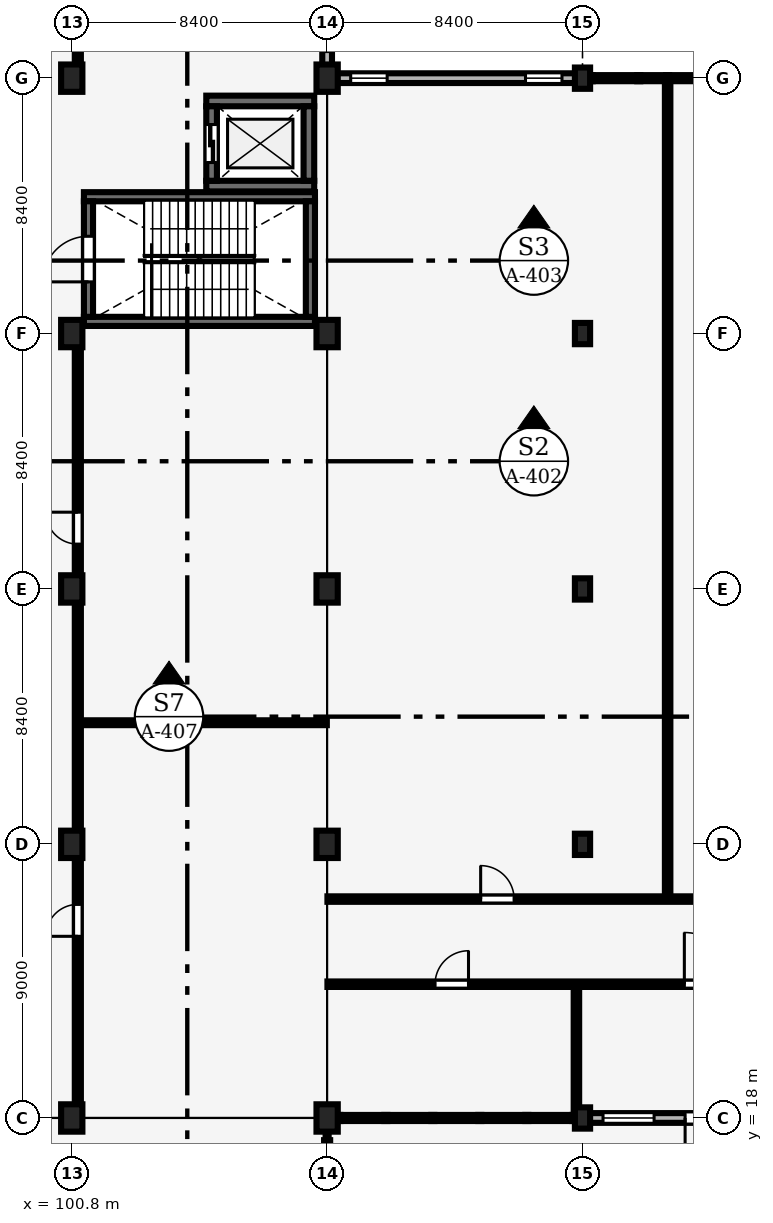
"""IFC4 building model, lengths in metres.
Left out: names, types, materials, properties, quantities, classifications, styles, units other than length and angle.
Written with IfcOpenShell. Run it as: python <this file> out.ifc"""

import sys

from ifc_helpers import new_model, si_unit, direction, frame, frame_2d, origin, origin_2d, place, context, subcontext, project, spatial, rectangle, extrude, element, fill, save


model = new_model("IFC4")
c1 = context("Model", 3, precision=1e-05, world=origin(), true_north=direction((0.0, 1.0)))
c2 = subcontext(c1, "Body", "Model", "MODEL_VIEW")
j1 = project(units=[si_unit("LENGTHUNIT", "METRE"), si_unit("PLANEANGLEUNIT", "RADIAN")], contexts=[c1])
p1 = place(None, origin())
s1 = spatial("IfcSite", under=j1, at=p1, CompositionType="ELEMENT")
p2 = place(p1, origin())
s2 = spatial("IfcBuilding", under=s1, at=p2, CompositionType="ELEMENT")
p3 = place(p2, origin())
s3 = spatial("IfcBuildingStorey", under=s2, at=p3, CompositionType="ELEMENT", Elevation=0.0)
for number, where, z_axis, x_axis in (
    (1, (100.8, 18.0, 0.0), (0.0, 0.0, 1.0), (1.0, 0.0, 0.0)),
    (2, (100.8, 27.0, 0.0), (0.0, 0.0, 1.0), (1.0, 0.0, 0.0)),
    (3, (100.8, 35.4, 0.0), (0.0, 0.0, 1.0), (1.0, 0.0, 0.0)),
    (4, (100.8, 43.8, 0.0), (0.0, 0.0, 1.0), (1.0, 0.0, 0.0)),
    (5, (100.8, 52.2, 0.0), (0.0, 0.0, 1.0), (1.0, 0.0, 0.0)),
    (6, (109.2, 18.0, 0.0), (0.0, 0.0, 1.0), (1.0, 0.0, 0.0)),
    (7, (109.2, 27.0, 0.0), (0.0, 0.0, 1.0), (1.0, 0.0, 0.0)),
    (8, (109.2, 35.4, 0.0), (0.0, 0.0, 1.0), (1.0, 0.0, 0.0)),
    (9, (109.2, 43.8, 0.0), (0.0, 0.0, 1.0), (1.0, 0.0, 0.0)),
    (10, (109.2, 52.2, 0.0), (0.0, 0.0, 1.0), (1.0, 0.0, 0.0)),
):
    element("IfcColumn", number, at=place(p3, frame(where, z_axis=z_axis, x_axis=x_axis)), inside=s3, PredefinedType="COLUMN", context=c2, shape_type="SweptSolid", body=[
        extrude(rectangle(XDim=0.7, YDim=0.9, at=origin_2d()), origin(), (0.0, 0.0, 1.0), 4.8),
    ])
for number, where, z_axis, x_axis in (
    (11, (117.6, 18.0, 0.0), (0.0, 0.0, 1.0), (1.0, 0.0, 0.0)),
    (12, (117.6, 27.0, 0.0), (0.0, 0.0, 1.0), (1.0, 0.0, 0.0)),
    (13, (117.6, 35.4, 0.0), (0.0, 0.0, 1.0), (1.0, 0.0, 0.0)),
    (14, (117.6, 43.8, 0.0), (0.0, 0.0, 1.0), (1.0, 0.0, 0.0)),
    (15, (117.6, 52.2, 0.0), (0.0, 0.0, 1.0), (1.0, 0.0, 0.0)),
):
    element("IfcColumn", number, at=place(p3, frame(where, z_axis=z_axis, x_axis=x_axis)), inside=s3, PredefinedType="COLUMN", context=c2, shape_type="SweptSolid", body=[
        extrude(rectangle(XDim=0.5, YDim=0.7, at=origin_2d()), origin(), (0.0, 0.0, 1.0), 4.8),
    ])
p4 = place(p3, frame((117.825, 18.0, 0.0), z_axis=(0.0, 0.0, 1.0), x_axis=(1.0, 0.0, 0.0)))
e16 = element("IfcWall", 16, at=p4, inside=s3, PredefinedType="SOLIDWALL", context=c2, shape_type="SweptSolid", body=[
    extrude(rectangle(XDim=7.95, YDim=0.32, at=frame_2d((3.975, 0.0))), origin(), (0.0, 0.0, 1.0), 3.37),
])
p5 = place(p4, frame((4.8, 0.0, 0.0), z_axis=(0.0, 0.0, 1.0), x_axis=(-1.0, 0.0, 0.0)))
e17 = element("IfcOpeningElement", 17, at=p5, cuts=e16, PredefinedType="OPENING", context=c2, shape_type="SweptSolid", body=[
    extrude(rectangle(XDim=1.65, YDim=2.25, at=frame_2d((0.825, 1.125))), frame((0.0, 0.17, 0.0), z_axis=(0.0, -1.0, 0.0), x_axis=(1.0, 0.0, 0.0)), (0.0, 0.0, 1.0), 0.34),
])
p6 = place(p4, frame((0.45, 0.0, 0.95)))
e18 = element("IfcOpeningElement", 18, at=p6, cuts=e16, PredefinedType="OPENING", context=c2, shape_type="SweptSolid", body=[
    extrude(rectangle(XDim=1.68, YDim=1.8, at=frame_2d((0.84, 0.9))), frame((0.0, 0.17, 0.0), z_axis=(0.0, -1.0, 0.0), x_axis=(1.0, 0.0, 0.0)), (0.0, 0.0, 1.0), 0.34),
])
p7 = place(p3, frame((109.525, 52.2, 0.0), z_axis=(0.0, 0.0, 1.0), x_axis=(1.0, 0.0, 0.0)))
e19 = element("IfcWall", 19, at=p7, inside=s3, PredefinedType="SOLIDWALL", context=c2, shape_type="SweptSolid", body=[
    extrude(rectangle(XDim=7.85, YDim=0.32, at=frame_2d((3.925, 0.0))), origin(), (0.0, 0.0, 1.0), 4.03),
])
p8 = place(p7, frame((0.45, 0.0, 0.9)))
e20 = element("IfcOpeningElement", 20, at=p8, cuts=e19, PredefinedType="OPENING", context=c2, shape_type="SweptSolid", body=[
    extrude(rectangle(XDim=1.2, YDim=1.5, at=frame_2d((0.6, 0.75))), frame((0.0, 0.17, 0.0), z_axis=(0.0, -1.0, 0.0), x_axis=(1.0, 0.0, 0.0)), (0.0, 0.0, 1.0), 0.34),
])
p9 = place(p7, frame((6.2, 0.0, 0.9)))
e21 = element("IfcOpeningElement", 21, at=p9, cuts=e19, PredefinedType="OPENING", context=c2, shape_type="SweptSolid", body=[
    extrude(rectangle(XDim=1.2, YDim=1.8, at=frame_2d((0.6, 0.9))), frame((0.0, 0.17, 0.0), z_axis=(0.0, -1.0, 0.0), x_axis=(1.0, 0.0, 0.0)), (0.0, 0.0, 1.0), 0.34),
])
p10 = place(p3, frame((109.2, 52.625, 0.0), z_axis=(0.0, 0.0, 1.0), x_axis=(0.0, 1.0, 0.0)))
e22 = element("IfcWall", 22, at=p10, inside=s3, PredefinedType="SOLIDWALL", context=c2, shape_type="SweptSolid", body=[
    extrude(rectangle(XDim=7.55, YDim=0.32, at=frame_2d((3.775, 0.0))), origin(), (0.0, 0.0, 1.0), 3.89),
])
p11 = place(p10, frame((4.6, 0.0, 0.0), z_axis=(0.0, 0.0, 1.0), x_axis=(-1.0, 0.0, 0.0)))
e23 = element("IfcOpeningElement", 23, at=p11, cuts=e22, PredefinedType="OPENING", context=c2, shape_type="SweptSolid", body=[
    extrude(rectangle(XDim=1.65, YDim=2.25, at=frame_2d((0.825, 1.125))), frame((0.0, 0.17, 0.0), z_axis=(0.0, -1.0, 0.0), x_axis=(1.0, 0.0, 0.0)), (0.0, 0.0, 1.0), 0.34),
])
p12 = place(p10, frame((0.45, 0.0, 0.95)))
e24 = element("IfcOpeningElement", 24, at=p12, cuts=e22, PredefinedType="OPENING", context=c2, shape_type="SweptSolid", body=[
    extrude(rectangle(XDim=1.68, YDim=2.1, at=frame_2d((0.84, 1.05))), frame((0.0, 0.17, 0.0), z_axis=(0.0, -1.0, 0.0), x_axis=(1.0, 0.0, 0.0)), (0.0, 0.0, 1.0), 0.34),
])
for number, where, z_axis, x_axis in (
    (25, (101.2, 44.2, 0.0), (0.0, 0.0, 1.0), (1.0, 0.0, 0.0)),
    (26, (101.2, 48.3, 0.0), (0.0, 0.0, 1.0), (1.0, 0.0, 0.0)),
):
    element("IfcWall", number, at=place(p3, frame(where, z_axis=z_axis, x_axis=x_axis)), inside=s3, PredefinedType="SHEAR", context=c2, shape_type="SweptSolid", body=[
        extrude(rectangle(XDim=7.6, YDim=0.3, at=frame_2d((3.8, 0.0))), origin(), (0.0, 0.0, 1.0), 4.625),
    ])
p13 = place(p3, frame((101.35, 44.35, 0.0), z_axis=(0.0, 0.0, 1.0), x_axis=(0.0, 1.0, 0.0)))
e27 = element("IfcWall", 27, at=p13, inside=s3, PredefinedType="SHEAR", context=c2, shape_type="SweptSolid", body=[
    extrude(rectangle(XDim=3.8, YDim=0.3, at=frame_2d((1.9, 0.0))), origin(), (0.0, 0.0, 1.0), 4.625),
])
p14 = place(p13, frame((1.15, 0.0, 0.0)))
e28 = element("IfcOpeningElement", 28, at=p14, cuts=e27, PredefinedType="OPENING", context=c2, shape_type="SweptSolid", body=[
    extrude(rectangle(XDim=1.5, YDim=2.2, at=frame_2d((0.75, 1.1))), frame((0.0, 0.16, 0.0), z_axis=(0.0, -1.0, 0.0), x_axis=(1.0, 0.0, 0.0)), (0.0, 0.0, 1.0), 0.32),
])
p15 = place(p3, frame((108.65, 44.35, 0.0), z_axis=(0.0, 0.0, 1.0), x_axis=(0.0, 1.0, 0.0)))
e29 = element("IfcWall", 29, at=p15, inside=s3, PredefinedType="SHEAR", context=c2, shape_type="SweptSolid", body=[
    extrude(rectangle(XDim=3.8, YDim=0.3, at=frame_2d((1.9, 0.0))), origin(), (0.0, 0.0, 1.0), 4.625),
])
for number, where, z_axis, x_axis in (
    (30, (105.225, 48.65, 0.0), (0.0, 0.0, 1.0), (1.0, 0.0, 0.0)),
    (31, (105.225, 51.45, 0.0), (0.0, 0.0, 1.0), (1.0, 0.0, 0.0)),
):
    element("IfcWall", number, at=place(p3, frame(where, z_axis=z_axis, x_axis=x_axis)), inside=s3, PredefinedType="SHEAR", context=c2, shape_type="SweptSolid", body=[
        extrude(rectangle(XDim=3.55, YDim=0.35, at=frame_2d((1.775, 0.0))), origin(), (0.0, 0.0, 1.0), 4.52),
    ])
p16 = place(p3, frame((105.4, 48.825, 0.0), z_axis=(0.0, 0.0, 1.0), x_axis=(0.0, 1.0, 0.0)))
e32 = element("IfcWall", 32, at=p16, inside=s3, PredefinedType="SHEAR", context=c2, shape_type="SweptSolid", body=[
    extrude(rectangle(XDim=2.45, YDim=0.35, at=frame_2d((1.225, 0.0))), origin(), (0.0, 0.0, 1.0), 4.52),
])
p17 = place(p16, frame((0.6, 0.0, 0.0)))
e33 = element("IfcOpeningElement", 33, at=p17, cuts=e32, PredefinedType="OPENING", context=c2, shape_type="SweptSolid", body=[
    extrude(rectangle(XDim=1.25, YDim=2.25, at=frame_2d((0.625, 1.125))), frame((0.0, 0.185, 0.0), z_axis=(0.0, -1.0, 0.0), x_axis=(1.0, 0.0, 0.0)), (0.0, 0.0, 1.0), 0.37),
])
p18 = place(p3, frame((108.6, 48.825, 0.0), z_axis=(0.0, 0.0, 1.0), x_axis=(0.0, 1.0, 0.0)))
e34 = element("IfcWall", 34, at=p18, inside=s3, PredefinedType="SHEAR", context=c2, shape_type="SweptSolid", body=[
    extrude(rectangle(XDim=2.45, YDim=0.35, at=frame_2d((1.225, 0.0))), origin(), (0.0, 0.0, 1.0), 4.52),
])
p19 = place(p3, frame((101.105, 31.0, 0.0), z_axis=(0.0, 0.0, 1.0), x_axis=(1.0, 0.0, 0.0)))
e35 = element("IfcWall", 35, at=p19, inside=s3, PredefinedType="PARTITIONING", context=c2, shape_type="SweptSolid", body=[
    extrude(rectangle(XDim=8.085, YDim=0.16, at=frame_2d((4.042, 0.0))), origin(), (0.0, 0.0, 1.0), 4.5),
])
p20 = place(p3, frame((101.0, 18.46, 0.0), z_axis=(0.0, 0.0, 1.0), x_axis=(0.0, 1.0, 0.0)))
e36 = element("IfcWall", 36, at=p20, inside=s3, PredefinedType="PARTITIONING", context=c2, shape_type="SweptSolid", body=[
    extrude(rectangle(XDim=8.08, YDim=0.2, at=frame_2d((4.04, 0.0))), origin(), (0.0, 0.0, 1.0), 3.84),
])
p21 = place(p20, frame((5.515, 0.0, 0.0)))
e37 = element("IfcOpeningElement", 37, at=p21, cuts=e36, PredefinedType="OPENING", context=c2, shape_type="SweptSolid", body=[
    extrude(rectangle(XDim=1.05, YDim=2.2, at=frame_2d((0.525, 1.1))), frame((0.0, 0.11, 0.0), z_axis=(0.0, -1.0, 0.0), x_axis=(1.0, 0.0, 0.0)), (0.0, 0.0, 1.0), 0.22),
])
p22 = place(p3, frame((101.0, 27.46, 0.0), z_axis=(0.0, 0.0, 1.0), x_axis=(0.0, 1.0, 0.0)))
e38 = element("IfcWall", 38, at=p22, inside=s3, PredefinedType="PARTITIONING", context=c2, shape_type="SweptSolid", body=[
    extrude(rectangle(XDim=7.48, YDim=0.2, at=frame_2d((3.74, 0.0))), origin(), (0.0, 0.0, 1.0), 3.89),
])
p23 = place(p3, frame((101.0, 35.86, 0.0), z_axis=(0.0, 0.0, 1.0), x_axis=(0.0, 1.0, 0.0)))
e39 = element("IfcWall", 39, at=p23, inside=s3, PredefinedType="PARTITIONING", context=c2, shape_type="SweptSolid", body=[
    extrude(rectangle(XDim=7.48, YDim=0.2, at=frame_2d((3.74, 0.0))), origin(), (0.0, 0.0, 1.0), 3.84),
])
p24 = place(p23, frame((1.015, 0.0, 0.0)))
e40 = element("IfcOpeningElement", 40, at=p24, cuts=e39, PredefinedType="OPENING", context=c2, shape_type="SweptSolid", body=[
    extrude(rectangle(XDim=1.05, YDim=2.2, at=frame_2d((0.525, 1.1))), frame((0.0, 0.11, 0.0), z_axis=(0.0, -1.0, 0.0), x_axis=(1.0, 0.0, 0.0)), (0.0, 0.0, 1.0), 0.22),
])
p25 = place(p3, frame((101.0, 52.66, 0.0), z_axis=(0.0, 0.0, 1.0), x_axis=(0.0, 1.0, 0.0)))
e41 = element("IfcWall", 41, at=p25, inside=s3, PredefinedType="PARTITIONING", context=c2, shape_type="SweptSolid", body=[
    extrude(rectangle(XDim=2.43, YDim=0.2, at=frame_2d((1.215, 0.0))), origin(), (0.0, 0.0, 1.0), 3.74),
])
p26 = place(p25, frame((0.74, 0.0, 0.0)))
e42 = element("IfcOpeningElement", 42, at=p26, cuts=e41, PredefinedType="OPENING", context=c2, shape_type="SweptSolid", body=[
    extrude(rectangle(XDim=1.0, YDim=2.25, at=frame_2d((0.5, 1.125))), frame((0.0, 0.11, 0.0), z_axis=(0.0, -1.0, 0.0), x_axis=(1.0, 0.0, 0.0)), (0.0, 0.0, 1.0), 0.22),
])
p27 = place(p3, frame((120.4, 25.295, 0.0), z_axis=(0.0, 0.0, 1.0), x_axis=(0.0, 1.0, 0.0)))
e43 = element("IfcWall", 43, at=p27, inside=s3, PredefinedType="PARTITIONING", context=c2, shape_type="SweptSolid", body=[
    extrude(rectangle(XDim=26.8, YDim=0.18, at=frame_2d((13.4, 0.0))), origin(), (0.0, 0.0, 1.0), 4.5),
])
p28 = place(p3, frame((109.21, 25.2, 0.0), z_axis=(0.0, 0.0, 1.0), x_axis=(1.0, 0.0, 0.0)))
e44 = element("IfcWall", 44, at=p28, inside=s3, PredefinedType="PARTITIONING", context=c2, shape_type="SweptSolid", body=[
    extrude(rectangle(XDim=33.58, YDim=0.18, at=frame_2d((16.79, 0.0))), origin(), (0.0, 0.0, 1.0), 4.5),
])
p29 = place(p28, frame((5.04, 0.0, 0.0)))
e45 = element("IfcOpeningElement", 45, at=p29, cuts=e44, PredefinedType="OPENING", context=c2, shape_type="SweptSolid", body=[
    extrude(rectangle(XDim=1.1, YDim=2.3, at=frame_2d((0.55, 1.15))), frame((0.0, 0.1, 0.0), z_axis=(0.0, -1.0, 0.0), x_axis=(1.0, 0.0, 0.0)), (0.0, 0.0, 1.0), 0.2),
])
p30 = place(p28, frame((16.24, 0.0, 0.0)))
e46 = element("IfcOpeningElement", 46, at=p30, cuts=e44, PredefinedType="OPENING", context=c2, shape_type="SweptSolid", body=[
    extrude(rectangle(XDim=1.1, YDim=2.3, at=frame_2d((0.55, 1.15))), frame((0.0, 0.1, 0.0), z_axis=(0.0, -1.0, 0.0), x_axis=(1.0, 0.0, 0.0)), (0.0, 0.0, 1.0), 0.2),
])
p31 = place(p28, frame((27.39, 0.0, 0.0)))
e47 = element("IfcOpeningElement", 47, at=p31, cuts=e44, PredefinedType="OPENING", context=c2, shape_type="SweptSolid", body=[
    extrude(rectangle(XDim=1.2, YDim=2.4, at=frame_2d((0.6, 1.2))), frame((0.0, 0.1, 0.0), z_axis=(0.0, -1.0, 0.0), x_axis=(1.0, 0.0, 0.0)), (0.0, 0.0, 1.0), 0.2),
])
p32 = place(p3, frame((117.4, 18.105, 0.0), z_axis=(0.0, 0.0, 1.0), x_axis=(0.0, 1.0, 0.0)))
e48 = element("IfcWall", 48, at=p32, inside=s3, PredefinedType="PARTITIONING", context=c2, shape_type="SweptSolid", body=[
    extrude(rectangle(XDim=4.2, YDim=0.18, at=frame_2d((2.1, 0.0))), origin(), (0.0, 0.0, 1.0), 3.72),
])
p33 = place(p3, frame((109.21, 22.4, 0.0), z_axis=(0.0, 0.0, 1.0), x_axis=(1.0, 0.0, 0.0)))
e49 = element("IfcWall", 49, at=p33, inside=s3, PredefinedType="PARTITIONING", context=c2, shape_type="SweptSolid", body=[
    extrude(rectangle(XDim=16.98, YDim=0.18, at=frame_2d((8.49, 0.0))), origin(), (0.0, 0.0, 1.0), 4.5),
])
p34 = place(p33, frame((3.54, 0.0, 0.0)))
e50 = element("IfcOpeningElement", 50, at=p34, cuts=e49, PredefinedType="OPENING", context=c2, shape_type="SweptSolid", body=[
    extrude(rectangle(XDim=1.1, YDim=2.3, at=frame_2d((0.55, 1.15))), frame((0.0, 0.1, 0.0), z_axis=(0.0, -1.0, 0.0), x_axis=(1.0, 0.0, 0.0)), (0.0, 0.0, 1.0), 0.2),
])
p35 = place(p33, frame((11.74, 0.0, 0.0)))
e51 = element("IfcOpeningElement", 51, at=p35, cuts=e49, PredefinedType="OPENING", context=c2, shape_type="SweptSolid", body=[
    extrude(rectangle(XDim=1.7, YDim=2.25, at=frame_2d((0.85, 1.125))), frame((0.0, 0.1, 0.0), z_axis=(0.0, -1.0, 0.0), x_axis=(1.0, 0.0, 0.0)), (0.0, 0.0, 1.0), 0.2),
])
p36 = place(p5, origin())
e52 = element("IfcDoor", 52, at=p36, inside=s3, OperationType="DOUBLE_DOOR_SINGLE_SWING", PredefinedType="DOOR", context=c2, shape_type="SweptSolid", body=[
    extrude(rectangle(XDim=1.65, YDim=2.25, at=frame_2d((0.825, 1.125))), frame((0.0, 0.025, 0.0), z_axis=(0.0, -1.0, 0.0), x_axis=(1.0, 0.0, 0.0)), (0.0, 0.0, 1.0), 0.05),
])
fill(e17, e52)
p37 = place(p6, origin())
e53 = element("IfcWindow", 53, at=p37, inside=s3, PartitioningType="SINGLE_PANEL", PredefinedType="WINDOW", context=c2, shape_type="SweptSolid", body=[
    extrude(rectangle(XDim=1.68, YDim=1.8, at=frame_2d((0.84, 0.9))), frame((0.0, 0.03, 0.0), z_axis=(0.0, -1.0, 0.0), x_axis=(1.0, 0.0, 0.0)), (0.0, 0.0, 1.0), 0.06),
])
fill(e18, e53)
p38 = place(p8, origin())
e54 = element("IfcWindow", 54, at=p38, inside=s3, PartitioningType="SINGLE_PANEL", PredefinedType="WINDOW", context=c2, shape_type="SweptSolid", body=[
    extrude(rectangle(XDim=1.2, YDim=1.5, at=frame_2d((0.6, 0.75))), frame((0.0, 0.03, 0.0), z_axis=(0.0, -1.0, 0.0), x_axis=(1.0, 0.0, 0.0)), (0.0, 0.0, 1.0), 0.06),
])
fill(e20, e54)
p39 = place(p9, origin())
e55 = element("IfcWindow", 55, at=p39, inside=s3, PartitioningType="SINGLE_PANEL", PredefinedType="WINDOW", context=c2, shape_type="SweptSolid", body=[
    extrude(rectangle(XDim=1.2, YDim=1.8, at=frame_2d((0.6, 0.9))), frame((0.0, 0.03, 0.0), z_axis=(0.0, -1.0, 0.0), x_axis=(1.0, 0.0, 0.0)), (0.0, 0.0, 1.0), 0.06),
])
fill(e21, e55)
p40 = place(p14, origin())
e56 = element("IfcDoor", 56, at=p40, inside=s3, OperationType="DOUBLE_DOOR_SINGLE_SWING", PredefinedType="DOOR", context=c2, shape_type="SweptSolid", body=[
    extrude(rectangle(XDim=1.5, YDim=2.2, at=frame_2d((0.75, 1.1))), frame((0.0, 0.025, 0.0), z_axis=(0.0, -1.0, 0.0), x_axis=(1.0, 0.0, 0.0)), (0.0, 0.0, 1.0), 0.05),
])
fill(e28, e56)
p41 = place(p17, origin())
e57 = element("IfcDoor", 57, at=p41, inside=s3, OperationType="DOUBLE_DOOR_SLIDING", PredefinedType="DOOR", context=c2, shape_type="SweptSolid", body=[
    extrude(rectangle(XDim=1.25, YDim=2.25, at=frame_2d((0.625, 1.125))), frame((0.0, 0.025, 0.0), z_axis=(0.0, -1.0, 0.0), x_axis=(1.0, 0.0, 0.0)), (0.0, 0.0, 1.0), 0.05),
])
fill(e33, e57)
p42 = place(p21, origin())
e58 = element("IfcDoor", 58, at=p42, inside=s3, OperationType="SINGLE_SWING_LEFT", PredefinedType="DOOR", context=c2, shape_type="SweptSolid", body=[
    extrude(rectangle(XDim=1.05, YDim=2.2, at=frame_2d((0.525, 1.1))), frame((0.0, 0.025, 0.0), z_axis=(0.0, -1.0, 0.0), x_axis=(1.0, 0.0, 0.0)), (0.0, 0.0, 1.0), 0.05),
])
fill(e37, e58)
p43 = place(p24, origin())
e59 = element("IfcDoor", 59, at=p43, inside=s3, OperationType="SINGLE_SWING_RIGHT", PredefinedType="DOOR", context=c2, shape_type="SweptSolid", body=[
    extrude(rectangle(XDim=1.05, YDim=2.2, at=frame_2d((0.525, 1.1))), frame((0.0, 0.025, 0.0), z_axis=(0.0, -1.0, 0.0), x_axis=(1.0, 0.0, 0.0)), (0.0, 0.0, 1.0), 0.05),
])
fill(e40, e59)
p44 = place(p29, origin())
e60 = element("IfcDoor", 60, at=p44, inside=s3, OperationType="SINGLE_SWING_LEFT", PredefinedType="DOOR", context=c2, shape_type="SweptSolid", body=[
    extrude(rectangle(XDim=1.1, YDim=2.3, at=frame_2d((0.55, 1.15))), frame((0.0, 0.025, 0.0), z_axis=(0.0, -1.0, 0.0), x_axis=(1.0, 0.0, 0.0)), (0.0, 0.0, 1.0), 0.05),
])
fill(e45, e60)
p45 = place(p34, origin())
e61 = element("IfcDoor", 61, at=p45, inside=s3, OperationType="SINGLE_SWING_RIGHT", PredefinedType="DOOR", context=c2, shape_type="SweptSolid", body=[
    extrude(rectangle(XDim=1.1, YDim=2.3, at=frame_2d((0.55, 1.15))), frame((0.0, 0.025, 0.0), z_axis=(0.0, -1.0, 0.0), x_axis=(1.0, 0.0, 0.0)), (0.0, 0.0, 1.0), 0.05),
])
fill(e50, e61)
p46 = place(p35, origin())
e62 = element("IfcDoor", 62, at=p46, inside=s3, OperationType="DOUBLE_DOOR_SINGLE_SWING", PredefinedType="DOOR", context=c2, shape_type="SweptSolid", body=[
    extrude(rectangle(XDim=1.7, YDim=2.25, at=frame_2d((0.85, 1.125))), frame((0.0, 0.025, 0.0), z_axis=(0.0, -1.0, 0.0), x_axis=(1.0, 0.0, 0.0)), (0.0, 0.0, 1.0), 0.05),
])
fill(e51, e62)
save(model, sys.argv[1])
